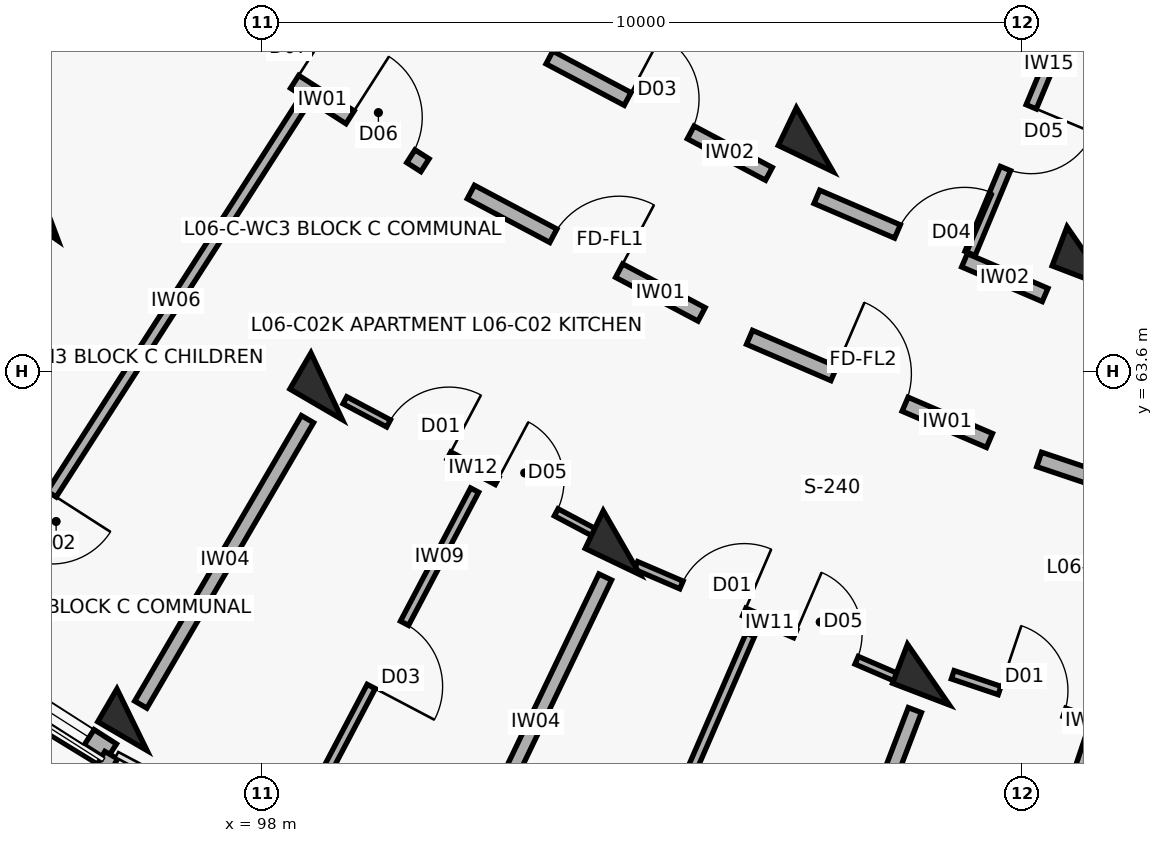
"""IFC4 building model, lengths in metres.
Left out: names, types, materials, properties, quantities, classifications, styles, units other than length and angle.
Written with IfcOpenShell. Run it as: python <this file> out.ifc"""

import sys

from ifc_helpers import new_model, si_unit, direction, frame, frame_2d, origin, origin_2d, place, context, subcontext, project, spatial, rectangle, extrude, element, fill, save


model = new_model("IFC4")
c1 = context("Model", 3, precision=1e-05, world=origin(), true_north=direction((0.0, 1.0)))
c2 = subcontext(c1, "Body", "Model", "MODEL_VIEW")
j1 = project(units=[si_unit("LENGTHUNIT", "METRE"), si_unit("PLANEANGLEUNIT", "RADIAN")], contexts=[c1])
p1 = place(None, origin())
s1 = spatial("IfcSite", under=j1, at=p1, CompositionType="ELEMENT")
p2 = place(p1, origin())
s2 = spatial("IfcBuilding", under=s1, at=p2, CompositionType="ELEMENT")
p3 = place(p2, frame((0.0, 0.0, 20.5)))
s3 = spatial("IfcBuildingStorey", under=s2, at=p3, CompositionType="ELEMENT", Elevation=20.5)
for number, where, z_axis, x_axis in (
    (1, (95.152, 65.768, 0.0), (0.0, 0.0, 1.0), (-0.573, -0.82, 0.0)),
    (2, (98.853, 63.4, 0.0), (0.0, 0.0, 1.0), (-0.504, -0.864, 0.0)),
):
    element("IfcColumn", number, at=place(p3, frame(where, z_axis=z_axis, x_axis=x_axis)), inside=s3, PredefinedType="COLUMN", context=c2, shape_type="SweptSolid", body=[
        extrude(rectangle(XDim=0.55, YDim=0.8, at=origin_2d()), origin(), (0.0, 0.0, 1.0), 3.1),
    ])
p4 = place(p3, frame((96.291, 59.013, 0.0), z_axis=(0.0, 0.0, 1.0), x_axis=(-0.504226211181, -0.863571611366, 0.0)))
e3 = element("IfcColumn", 3, at=p4, inside=s3, PredefinedType="COLUMN", context=c2, shape_type="SweptSolid", body=[
    extrude(rectangle(XDim=0.5, YDim=0.75, at=origin_2d()), origin(), (0.0, 0.0, 1.0), 3.1),
])
for number, where, z_axis, x_axis in (
    (4, (105.274, 66.644, 0.0), (0.0, 0.0, 1.0), (-0.432, -0.902, 0.0)),
    (5, (102.734, 61.341, 0.0), (0.0, 0.0, 1.0), (-0.432, -0.902, 0.0)),
    (6, (108.869, 65.099, 0.0), (0.0, 0.0, 1.0), (-0.357, -0.934, 0.0)),
    (7, (106.77, 59.606, 0.0), (0.0, 0.0, 1.0), (-0.357, -0.934, 0.0)),
):
    element("IfcColumn", number, at=place(p3, frame(where, z_axis=z_axis, x_axis=x_axis)), inside=s3, PredefinedType="COLUMN", context=c2, shape_type="SweptSolid", body=[
        extrude(rectangle(XDim=0.55, YDim=0.8, at=origin_2d()), origin(), (0.0, 0.0, 1.0), 3.1),
    ])
p5 = place(p3, frame((91.972, 61.184, 0.0), z_axis=(0.0, 0.0, 1.0), x_axis=(0.84226218024, -0.539068103061, 0.0)))
e8 = element("IfcWall", 8, at=p5, inside=s3, PredefinedType="SOLIDWALL", context=c2, shape_type="SweptSolid", body=[
    extrude(rectangle(XDim=4.809, YDim=0.242, at=frame_2d((2.404, 0.0))), origin(), (0.0, 0.0, 1.0), 2.25),
])
p6 = place(p5, frame((0.4, 0.0, 0.0)))
e9 = element("IfcOpeningElement", 9, at=p6, cuts=e8, PredefinedType="OPENING", context=c2, shape_type="SweptSolid", body=[
    extrude(rectangle(XDim=1.1, YDim=2.15, at=frame_2d((0.55, 1.075))), frame((0.0, 0.131, 0.0), z_axis=(0.0, -1.0, 0.0), x_axis=(1.0, 0.0, 0.0)), (0.0, 0.0, 1.0), 0.262),
])
p7 = place(p5, frame((2.659, 0.0, 0.35)))
e10 = element("IfcOpeningElement", 10, at=p7, cuts=e8, PredefinedType="OPENING", context=c2, shape_type="SweptSolid", body=[
    extrude(rectangle(XDim=1.8, YDim=1.65, at=frame_2d((0.9, 0.825))), frame((0.0, 0.131, 0.0), z_axis=(0.0, -1.0, 0.0), x_axis=(1.0, 0.0, 0.0)), (0.0, 0.0, 1.0), 0.262),
])
p8 = place(p3, frame((96.019, 58.547, 0.0), z_axis=(0.0, 0.0, 1.0), x_axis=(-0.504228145431, -0.863570481985, 0.0)))
e11 = element("IfcWall", 11, at=p8, inside=s3, PredefinedType="PARAPET", context=c2, shape_type="SweptSolid", body=[
    extrude(rectangle(XDim=1.53, YDim=0.195, at=frame_2d((0.765, 0.0))), origin(), (0.0, 0.0, 1.0), 2.25),
])
p9 = place(p3, frame((97.252, 68.161, 0.0), z_axis=(0.0, 0.0, 1.0), x_axis=(0.842289466461, -0.53902546757, 0.0)))
e12 = element("IfcWall", 12, at=p9, inside=s3, PredefinedType="SOLIDWALL", context=c2, shape_type="SweptSolid", body=[
    extrude(rectangle(XDim=3.436, YDim=0.2, at=frame_2d((1.718, 0.0))), origin(), (0.0, 0.0, 1.0), 2.08),
])
p10 = place(p9, frame((0.28, 0.0, 0.0)))
e13 = element("IfcOpeningElement", 13, at=p10, cuts=e12, PredefinedType="OPENING", context=c2, shape_type="SweptSolid", body=[
    extrude(rectangle(XDim=1.12, YDim=2.15, at=frame_2d((0.56, 1.075))), frame((0.0, 0.11, 0.0), z_axis=(0.0, -1.0, 0.0), x_axis=(1.0, 0.0, 0.0)), (0.0, 0.0, 1.0), 0.22),
])
p11 = place(p9, frame((2.266, 0.0, 0.0)))
e14 = element("IfcOpeningElement", 14, at=p11, cuts=e12, PredefinedType="OPENING", context=c2, shape_type="SweptSolid", body=[
    extrude(rectangle(XDim=0.95, YDim=2.1, at=frame_2d((0.475, 1.05))), frame((0.0, 0.11, 0.0), z_axis=(0.0, -1.0, 0.0), x_axis=(1.0, 0.0, 0.0)), (0.0, 0.0, 1.0), 0.22),
])
p12 = place(p3, frame((98.504, 67.072, 0.0), z_axis=(0.0, 0.0, 1.0), x_axis=(-0.540338452216, -0.841447774408, 0.0)))
e15 = element("IfcWall", 15, at=p12, inside=s3, PredefinedType="PARTITIONING", context=c2, shape_type="SweptSolid", body=[
    extrude(rectangle(XDim=7.95, YDim=0.14, at=frame_2d((3.975, 0.0))), origin(), (0.0, 0.0, 1.0), 2.08),
])
p13 = place(p12, frame((6.05, 0.0, 0.0)))
e16 = element("IfcOpeningElement", 16, at=p13, cuts=e15, PredefinedType="OPENING", context=c2, shape_type="SweptSolid", body=[
    extrude(rectangle(XDim=0.92, YDim=2.1, at=frame_2d((0.46, 1.05))), frame((0.0, 0.08, 0.0), z_axis=(0.0, -1.0, 0.0), x_axis=(1.0, 0.0, 0.0)), (0.0, 0.0, 1.0), 0.16),
])
p14 = place(p3, frame((100.75, 65.956, 0.0), z_axis=(0.0, 0.0, 1.0), x_axis=(0.883440266101, -0.468543803963, 0.0)))
e17 = element("IfcWall", 17, at=p14, inside=s3, PredefinedType="SOLIDWALL", context=c2, shape_type="SweptSolid", body=[
    extrude(rectangle(XDim=3.436, YDim=0.2, at=frame_2d((1.718, 0.0))), origin(), (0.0, 0.0, 1.0), 2.08),
])
p15 = place(p14, frame((1.228, 0.0, 0.0)))
e18 = element("IfcOpeningElement", 18, at=p15, cuts=e17, PredefinedType="OPENING", context=c2, shape_type="SweptSolid", body=[
    extrude(rectangle(XDim=0.98, YDim=2.15, at=frame_2d((0.49, 1.075))), frame((0.0, 0.11, 0.0), z_axis=(0.0, -1.0, 0.0), x_axis=(1.0, 0.0, 0.0)), (0.0, 0.0, 1.0), 0.22),
])
p16 = place(p3, frame((101.784, 67.726, 0.0), z_axis=(0.0, 0.0, 1.0), x_axis=(0.883444301944, -0.468536194293, 0.0)))
e19 = element("IfcWall", 19, at=p16, inside=s3, PredefinedType="SOLIDWALL", context=c2, shape_type="SweptSolid", body=[
    extrude(rectangle(XDim=3.269, YDim=0.19, at=frame_2d((1.634, 0.0))), origin(), (0.0, 0.0, 1.0), 2.08),
])
p17 = place(p16, frame((1.164, 0.0, 0.0)))
e20 = element("IfcOpeningElement", 20, at=p17, cuts=e19, PredefinedType="OPENING", context=c2, shape_type="SweptSolid", body=[
    extrude(rectangle(XDim=0.94, YDim=2.1, at=frame_2d((0.47, 1.05))), frame((0.0, 0.105, 0.0), z_axis=(0.0, -1.0, 0.0), x_axis=(1.0, 0.0, 0.0)), (0.0, 0.0, 1.0), 0.21),
])
p18 = place(p3, frame((99.093, 63.216, 0.0), z_axis=(0.0, 0.0, 1.0), x_axis=(0.883432667361, -0.468558131121, 0.0)))
e21 = element("IfcWall", 21, at=p18, inside=s3, PredefinedType="PARTITIONING", context=c2, shape_type="SweptSolid", body=[
    extrude(rectangle(XDim=3.797, YDim=0.105, at=frame_2d((1.899, 0.0))), origin(), (0.0, 0.0, 1.0), 2.08),
])
p19 = place(p18, frame((0.65, 0.0, 0.0)))
e22 = element("IfcOpeningElement", 22, at=p19, cuts=e21, PredefinedType="OPENING", context=c2, shape_type="SweptSolid", body=[
    extrude(rectangle(XDim=0.9, YDim=2.1, at=frame_2d((0.45, 1.05))), frame((0.0, 0.062, 0.0), z_axis=(0.0, -1.0, 0.0), x_axis=(1.0, 0.0, 0.0)), (0.0, 0.0, 1.0), 0.125),
])
p20 = place(p18, frame((2.267, 0.0, 0.0)))
e23 = element("IfcOpeningElement", 23, at=p20, cuts=e21, PredefinedType="OPENING", context=c2, shape_type="SweptSolid", body=[
    extrude(rectangle(XDim=0.88, YDim=2.1, at=frame_2d((0.44, 1.05))), frame((0.0, 0.062, 0.0), z_axis=(0.0, -1.0, 0.0), x_axis=(1.0, 0.0, 0.0)), (0.0, 0.0, 1.0), 0.125),
])
p21 = place(p3, frame((100.799, 62.034, 0.0), z_axis=(0.0, 0.0, 1.0), x_axis=(-0.465869641373, -0.884853364828, 0.0)))
e24 = element("IfcWall", 24, at=p21, inside=s3, PredefinedType="PARTITIONING", context=c2, shape_type="SweptSolid", body=[
    extrude(rectangle(XDim=4.9, YDim=0.12, at=frame_2d((2.45, 0.0))), origin(), (0.0, 0.0, 1.0), 2.08),
])
p22 = place(p21, frame((1.98, 0.0, 0.0)))
e25 = element("IfcOpeningElement", 25, at=p22, cuts=e24, PredefinedType="OPENING", context=c2, shape_type="SweptSolid", body=[
    extrude(rectangle(XDim=0.94, YDim=2.1, at=frame_2d((0.47, 1.05))), frame((0.0, 0.07, 0.0), z_axis=(0.0, -1.0, 0.0), x_axis=(1.0, 0.0, 0.0)), (0.0, 0.0, 1.0), 0.14),
])
p23 = place(p3, frame((98.601, 62.968, 0.0), z_axis=(0.0, 0.0, 1.0), x_axis=(-0.504216452091, -0.863577309475, 0.0)))
e26 = element("IfcWall", 26, at=p23, inside=s3, PredefinedType="SOLIDWALL", context=c2, shape_type="SweptSolid", body=[
    extrude(rectangle(XDim=4.35, YDim=0.185, at=frame_2d((2.175, 0.0))), origin(), (0.0, 0.0, 1.0), 2.08),
])
p24 = place(p3, frame((104.417, 64.044, 0.0), z_axis=(0.0, 0.0, 1.0), x_axis=(0.918718172399, -0.394913813008, 0.0)))
e27 = element("IfcWall", 27, at=p24, inside=s3, PredefinedType="SOLIDWALL", context=c2, shape_type="SweptSolid", body=[
    extrude(rectangle(XDim=3.436, YDim=0.2, at=frame_2d((1.718, 0.0))), origin(), (0.0, 0.0, 1.0), 2.08),
])
p25 = place(p24, frame((1.208, 0.0, 0.0)))
e28 = element("IfcOpeningElement", 28, at=p25, cuts=e27, PredefinedType="OPENING", context=c2, shape_type="SweptSolid", body=[
    extrude(rectangle(XDim=1.02, YDim=2.15, at=frame_2d((0.51, 1.075))), frame((0.0, 0.11, 0.0), z_axis=(0.0, -1.0, 0.0), x_axis=(1.0, 0.0, 0.0)), (0.0, 0.0, 1.0), 0.22),
])
p26 = place(p3, frame((105.302, 65.893, 0.0), z_axis=(0.0, 0.0, 1.0), x_axis=(0.918723391052, -0.394901672235, 0.0)))
e29 = element("IfcWall", 29, at=p26, inside=s3, PredefinedType="SOLIDWALL", context=c2, shape_type="SweptSolid", body=[
    extrude(rectangle(XDim=3.269, YDim=0.19, at=frame_2d((1.634, 0.0))), origin(), (0.0, 0.0, 1.0), 2.08),
])
p27 = place(p26, frame((1.154, 0.0, 0.0)))
e30 = element("IfcOpeningElement", 30, at=p27, cuts=e29, PredefinedType="OPENING", context=c2, shape_type="SweptSolid", body=[
    extrude(rectangle(XDim=0.96, YDim=2.1, at=frame_2d((0.48, 1.05))), frame((0.0, 0.105, 0.0), z_axis=(0.0, -1.0, 0.0), x_axis=(1.0, 0.0, 0.0)), (0.0, 0.0, 1.0), 0.21),
])
p28 = place(p3, frame((108.589, 68.194, 0.0), z_axis=(0.0, 0.0, 1.0), x_axis=(-0.385151143297, -0.922853507777, 0.0)))
e31 = element("IfcWall", 31, at=p28, inside=s3, PredefinedType="PARTITIONING", context=c2, shape_type="SweptSolid", body=[
    extrude(rectangle(XDim=3.3, YDim=0.145, at=frame_2d((1.65, 0.0))), origin(), (0.0, 0.0, 1.0), 2.08),
])
p29 = place(p28, frame((1.21, 0.0, 0.0)))
e32 = element("IfcOpeningElement", 32, at=p29, cuts=e31, PredefinedType="OPENING", context=c2, shape_type="SweptSolid", body=[
    extrude(rectangle(XDim=0.88, YDim=2.1, at=frame_2d((0.44, 1.05))), frame((0.0, 0.083, 0.0), z_axis=(0.0, -1.0, 0.0), x_axis=(1.0, 0.0, 0.0)), (0.0, 0.0, 1.0), 0.165),
])
p30 = place(p3, frame((102.923, 61.042, 0.0), z_axis=(0.0, 0.0, 1.0), x_axis=(0.918716859611, -0.394916867033, 0.0)))
e33 = element("IfcWall", 33, at=p30, inside=s3, PredefinedType="PARTITIONING", context=c2, shape_type="SweptSolid", body=[
    extrude(rectangle(XDim=3.809, YDim=0.11, at=frame_2d((1.905, 0.0))), origin(), (0.0, 0.0, 1.0), 2.08),
])
p31 = place(p30, frame((0.65, 0.0, 0.0)))
e34 = element("IfcOpeningElement", 34, at=p31, cuts=e33, PredefinedType="OPENING", context=c2, shape_type="SweptSolid", body=[
    extrude(rectangle(XDim=0.9, YDim=2.1, at=frame_2d((0.45, 1.05))), frame((0.0, 0.065, 0.0), z_axis=(0.0, -1.0, 0.0), x_axis=(1.0, 0.0, 0.0)), (0.0, 0.0, 1.0), 0.13),
])
p32 = place(p30, frame((2.28, 0.0, 0.0)))
e35 = element("IfcOpeningElement", 35, at=p32, cuts=e33, PredefinedType="OPENING", context=c2, shape_type="SweptSolid", body=[
    extrude(rectangle(XDim=0.88, YDim=2.1, at=frame_2d((0.44, 1.05))), frame((0.0, 0.065, 0.0), z_axis=(0.0, -1.0, 0.0), x_axis=(1.0, 0.0, 0.0)), (0.0, 0.0, 1.0), 0.13),
])
p33 = place(p3, frame((104.426, 60.13, 0.0), z_axis=(0.0, 0.0, 1.0), x_axis=(-0.39765647791, -0.917534372967, 0.0)))
e36 = element("IfcWall", 36, at=p33, inside=s3, PredefinedType="PARTITIONING", context=c2, shape_type="SweptSolid", body=[
    extrude(rectangle(XDim=4.75, YDim=0.12, at=frame_2d((2.375, 0.0))), origin(), (0.0, 0.0, 1.0), 2.08),
])
p34 = place(p33, frame((1.895, 0.0, 0.0)))
e37 = element("IfcOpeningElement", 37, at=p34, cuts=e36, PredefinedType="OPENING", context=c2, shape_type="SweptSolid", body=[
    extrude(rectangle(XDim=0.96, YDim=2.1, at=frame_2d((0.48, 1.05))), frame((0.0, 0.07, 0.0), z_axis=(0.0, -1.0, 0.0), x_axis=(1.0, 0.0, 0.0)), (0.0, 0.0, 1.0), 0.14),
])
p35 = place(p3, frame((102.518, 60.89, 0.0), z_axis=(0.0, 0.0, 1.0), x_axis=(-0.432108769108, -0.901821496561, 0.0)))
e38 = element("IfcWall", 38, at=p35, inside=s3, PredefinedType="SOLIDWALL", context=c2, shape_type="SweptSolid", body=[
    extrude(rectangle(XDim=4.35, YDim=0.185, at=frame_2d((2.175, 0.0))), origin(), (0.0, 0.0, 1.0), 2.08),
])
p36 = place(p3, frame((108.227, 62.437, 0.0), z_axis=(0.0, 0.0, 1.0), x_axis=(0.947884468821, -0.318614239745, 0.0)))
e39 = element("IfcWall", 39, at=p36, inside=s3, PredefinedType="SOLIDWALL", context=c2, shape_type="SweptSolid", body=[
    extrude(rectangle(XDim=3.436, YDim=0.2, at=frame_2d((1.718, 0.0))), origin(), (0.0, 0.0, 1.0), 2.08),
])
p37 = place(p36, frame((1.228, 0.0, 0.0)))
e40 = element("IfcOpeningElement", 40, at=p37, cuts=e39, PredefinedType="OPENING", context=c2, shape_type="SweptSolid", body=[
    extrude(rectangle(XDim=0.98, YDim=2.15, at=frame_2d((0.49, 1.075))), frame((0.0, 0.11, 0.0), z_axis=(0.0, -1.0, 0.0), x_axis=(1.0, 0.0, 0.0)), (0.0, 0.0, 1.0), 0.22),
])
p38 = place(p3, frame((107.09, 59.604, 0.0), z_axis=(0.0, 0.0, 1.0), x_axis=(0.947873924847, -0.318645606584, 0.0)))
e41 = element("IfcWall", 41, at=p38, inside=s3, PredefinedType="PARTITIONING", context=c2, shape_type="SweptSolid", body=[
    extrude(rectangle(XDim=3.785, YDim=0.115, at=frame_2d((1.893, 0.0))), origin(), (0.0, 0.0, 1.0), 2.08),
])
p39 = place(p38, frame((0.65, 0.0, 0.0)))
e42 = element("IfcOpeningElement", 42, at=p39, cuts=e41, PredefinedType="OPENING", context=c2, shape_type="SweptSolid", body=[
    extrude(rectangle(XDim=0.9, YDim=2.1, at=frame_2d((0.45, 1.05))), frame((0.0, 0.067, 0.0), z_axis=(0.0, -1.0, 0.0), x_axis=(1.0, 0.0, 0.0)), (0.0, 0.0, 1.0), 0.135),
])
p40 = place(p38, frame((2.255, 0.0, 0.0)))
e43 = element("IfcOpeningElement", 43, at=p40, cuts=e41, PredefinedType="OPENING", context=c2, shape_type="SweptSolid", body=[
    extrude(rectangle(XDim=0.88, YDim=2.1, at=frame_2d((0.44, 1.05))), frame((0.0, 0.067, 0.0), z_axis=(0.0, -1.0, 0.0), x_axis=(1.0, 0.0, 0.0)), (0.0, 0.0, 1.0), 0.135),
])
p41 = place(p3, frame((108.883, 58.743, 0.0), z_axis=(0.0, 0.0, 1.0), x_axis=(-0.317199358555, -0.948358880874, 0.0)))
e44 = element("IfcWall", 44, at=p41, inside=s3, PredefinedType="PARTITIONING", context=c2, shape_type="SweptSolid", body=[
    extrude(rectangle(XDim=5.05, YDim=0.12, at=frame_2d((2.525, 0.0))), origin(), (0.0, 0.0, 1.0), 2.08),
])
p42 = place(p41, frame((2.1, 0.0, 0.0)))
e45 = element("IfcOpeningElement", 45, at=p42, cuts=e44, PredefinedType="OPENING", context=c2, shape_type="SweptSolid", body=[
    extrude(rectangle(XDim=0.85, YDim=2.1, at=frame_2d((0.425, 1.05))), frame((0.0, 0.07, 0.0), z_axis=(0.0, -1.0, 0.0), x_axis=(1.0, 0.0, 0.0)), (0.0, 0.0, 1.0), 0.14),
])
p43 = place(p3, frame((106.591, 59.139, 0.0), z_axis=(0.0, 0.0, 1.0), x_axis=(-0.357064016205, -0.934079915388, 0.0)))
e46 = element("IfcWall", 46, at=p43, inside=s3, PredefinedType="SOLIDWALL", context=c2, shape_type="SweptSolid", body=[
    extrude(rectangle(XDim=4.35, YDim=0.185, at=frame_2d((2.175, 0.0))), origin(), (0.0, 0.0, 1.0), 2.08),
])
p44 = place(p7, origin())
e47 = element("IfcWindow", 47, at=p44, inside=s3, PartitioningType="TRIPLE_PANEL_VERTICAL", PredefinedType="WINDOW", context=c2, shape_type="SweptSolid", body=[
    extrude(rectangle(XDim=1.8, YDim=1.65, at=frame_2d((0.9, 0.825))), frame((0.0, 0.03, 0.0), z_axis=(0.0, -1.0, 0.0), x_axis=(1.0, 0.0, 0.0)), (0.0, 0.0, 1.0), 0.06),
])
fill(e10, e47)
p45 = place(p10, origin())
e48 = element("IfcDoor", 48, at=p45, inside=s3, OperationType="SINGLE_SWING_RIGHT", PredefinedType="DOOR", context=c2, shape_type="SweptSolid", body=[
    extrude(rectangle(XDim=1.12, YDim=2.15, at=frame_2d((0.56, 1.075))), frame((0.0, 0.025, 0.0), z_axis=(0.0, -1.0, 0.0), x_axis=(1.0, 0.0, 0.0)), (0.0, 0.0, 1.0), 0.05),
])
fill(e13, e48)
p46 = place(p11, origin())
e49 = element("IfcDoor", 49, at=p46, inside=s3, OperationType="SINGLE_SWING_LEFT", PredefinedType="DOOR", context=c2, shape_type="SweptSolid", body=[
    extrude(rectangle(XDim=0.95, YDim=2.1, at=frame_2d((0.475, 1.05))), frame((0.0, 0.025, 0.0), z_axis=(0.0, -1.0, 0.0), x_axis=(1.0, 0.0, 0.0)), (0.0, 0.0, 1.0), 0.05),
])
fill(e14, e49)
p47 = place(p13, origin())
e50 = element("IfcDoor", 50, at=p47, inside=s3, OperationType="SINGLE_SWING_LEFT", PredefinedType="DOOR", context=c2, shape_type="SweptSolid", body=[
    extrude(rectangle(XDim=0.92, YDim=2.1, at=frame_2d((0.46, 1.05))), frame((0.0, 0.025, 0.0), z_axis=(0.0, -1.0, 0.0), x_axis=(1.0, 0.0, 0.0)), (0.0, 0.0, 1.0), 0.05),
])
fill(e16, e50)
p48 = place(p15, origin())
e51 = element("IfcDoor", 51, at=p48, inside=s3, OperationType="SINGLE_SWING_RIGHT", PredefinedType="DOOR", context=c2, shape_type="SweptSolid", body=[
    extrude(rectangle(XDim=0.98, YDim=2.15, at=frame_2d((0.49, 1.075))), frame((0.0, 0.025, 0.0), z_axis=(0.0, -1.0, 0.0), x_axis=(1.0, 0.0, 0.0)), (0.0, 0.0, 1.0), 0.05),
])
fill(e18, e51)
p49 = place(p17, origin())
e52 = element("IfcDoor", 52, at=p49, inside=s3, OperationType="SINGLE_SWING_LEFT", PredefinedType="DOOR", context=c2, shape_type="SweptSolid", body=[
    extrude(rectangle(XDim=0.94, YDim=2.1, at=frame_2d((0.47, 1.05))), frame((0.0, 0.025, 0.0), z_axis=(0.0, -1.0, 0.0), x_axis=(1.0, 0.0, 0.0)), (0.0, 0.0, 1.0), 0.05),
])
fill(e20, e52)
p50 = place(p19, origin())
e53 = element("IfcDoor", 53, at=p50, inside=s3, OperationType="SINGLE_SWING_RIGHT", PredefinedType="DOOR", context=c2, shape_type="SweptSolid", body=[
    extrude(rectangle(XDim=0.9, YDim=2.1, at=frame_2d((0.45, 1.05))), frame((0.0, 0.025, 0.0), z_axis=(0.0, -1.0, 0.0), x_axis=(1.0, 0.0, 0.0)), (0.0, 0.0, 1.0), 0.05),
])
fill(e22, e53)
p51 = place(p20, origin())
e54 = element("IfcDoor", 54, at=p51, inside=s3, OperationType="SINGLE_SWING_LEFT", PredefinedType="DOOR", context=c2, shape_type="SweptSolid", body=[
    extrude(rectangle(XDim=0.88, YDim=2.1, at=frame_2d((0.44, 1.05))), frame((0.0, 0.025, 0.0), z_axis=(0.0, -1.0, 0.0), x_axis=(1.0, 0.0, 0.0)), (0.0, 0.0, 1.0), 0.05),
])
fill(e23, e54)
p52 = place(p22, origin())
e55 = element("IfcDoor", 55, at=p52, inside=s3, OperationType="SINGLE_SWING_RIGHT", PredefinedType="DOOR", context=c2, shape_type="SweptSolid", body=[
    extrude(rectangle(XDim=0.94, YDim=2.1, at=frame_2d((0.47, 1.05))), frame((0.0, 0.025, 0.0), z_axis=(0.0, -1.0, 0.0), x_axis=(1.0, 0.0, 0.0)), (0.0, 0.0, 1.0), 0.05),
])
fill(e25, e55)
p53 = place(p25, origin())
e56 = element("IfcDoor", 56, at=p53, inside=s3, OperationType="SINGLE_SWING_LEFT", PredefinedType="DOOR", context=c2, shape_type="SweptSolid", body=[
    extrude(rectangle(XDim=1.02, YDim=2.15, at=frame_2d((0.51, 1.075))), frame((0.0, 0.025, 0.0), z_axis=(0.0, -1.0, 0.0), x_axis=(1.0, 0.0, 0.0)), (0.0, 0.0, 1.0), 0.05),
])
fill(e28, e56)
p54 = place(p27, origin())
e57 = element("IfcDoor", 57, at=p54, inside=s3, OperationType="SINGLE_SWING_RIGHT", PredefinedType="DOOR", context=c2, shape_type="SweptSolid", body=[
    extrude(rectangle(XDim=0.96, YDim=2.1, at=frame_2d((0.48, 1.05))), frame((0.0, 0.025, 0.0), z_axis=(0.0, -1.0, 0.0), x_axis=(1.0, 0.0, 0.0)), (0.0, 0.0, 1.0), 0.05),
])
fill(e30, e57)
p55 = place(p29, origin())
e58 = element("IfcDoor", 58, at=p55, inside=s3, OperationType="SINGLE_SWING_LEFT", PredefinedType="DOOR", context=c2, shape_type="SweptSolid", body=[
    extrude(rectangle(XDim=0.88, YDim=2.1, at=frame_2d((0.44, 1.05))), frame((0.0, 0.025, 0.0), z_axis=(0.0, -1.0, 0.0), x_axis=(1.0, 0.0, 0.0)), (0.0, 0.0, 1.0), 0.05),
])
fill(e32, e58)
p56 = place(p31, origin())
e59 = element("IfcDoor", 59, at=p56, inside=s3, OperationType="SINGLE_SWING_RIGHT", PredefinedType="DOOR", context=c2, shape_type="SweptSolid", body=[
    extrude(rectangle(XDim=0.9, YDim=2.1, at=frame_2d((0.45, 1.05))), frame((0.0, 0.025, 0.0), z_axis=(0.0, -1.0, 0.0), x_axis=(1.0, 0.0, 0.0)), (0.0, 0.0, 1.0), 0.05),
])
fill(e34, e59)
p57 = place(p32, origin())
e60 = element("IfcDoor", 60, at=p57, inside=s3, OperationType="SINGLE_SWING_LEFT", PredefinedType="DOOR", context=c2, shape_type="SweptSolid", body=[
    extrude(rectangle(XDim=0.88, YDim=2.1, at=frame_2d((0.44, 1.05))), frame((0.0, 0.025, 0.0), z_axis=(0.0, -1.0, 0.0), x_axis=(1.0, 0.0, 0.0)), (0.0, 0.0, 1.0), 0.05),
])
fill(e35, e60)
p58 = place(p39, origin())
e61 = element("IfcDoor", 61, at=p58, inside=s3, OperationType="SINGLE_SWING_LEFT", PredefinedType="DOOR", context=c2, shape_type="SweptSolid", body=[
    extrude(rectangle(XDim=0.9, YDim=2.1, at=frame_2d((0.45, 1.05))), frame((0.0, 0.025, 0.0), z_axis=(0.0, -1.0, 0.0), x_axis=(1.0, 0.0, 0.0)), (0.0, 0.0, 1.0), 0.05),
])
fill(e42, e61)
save(model, sys.argv[1])
